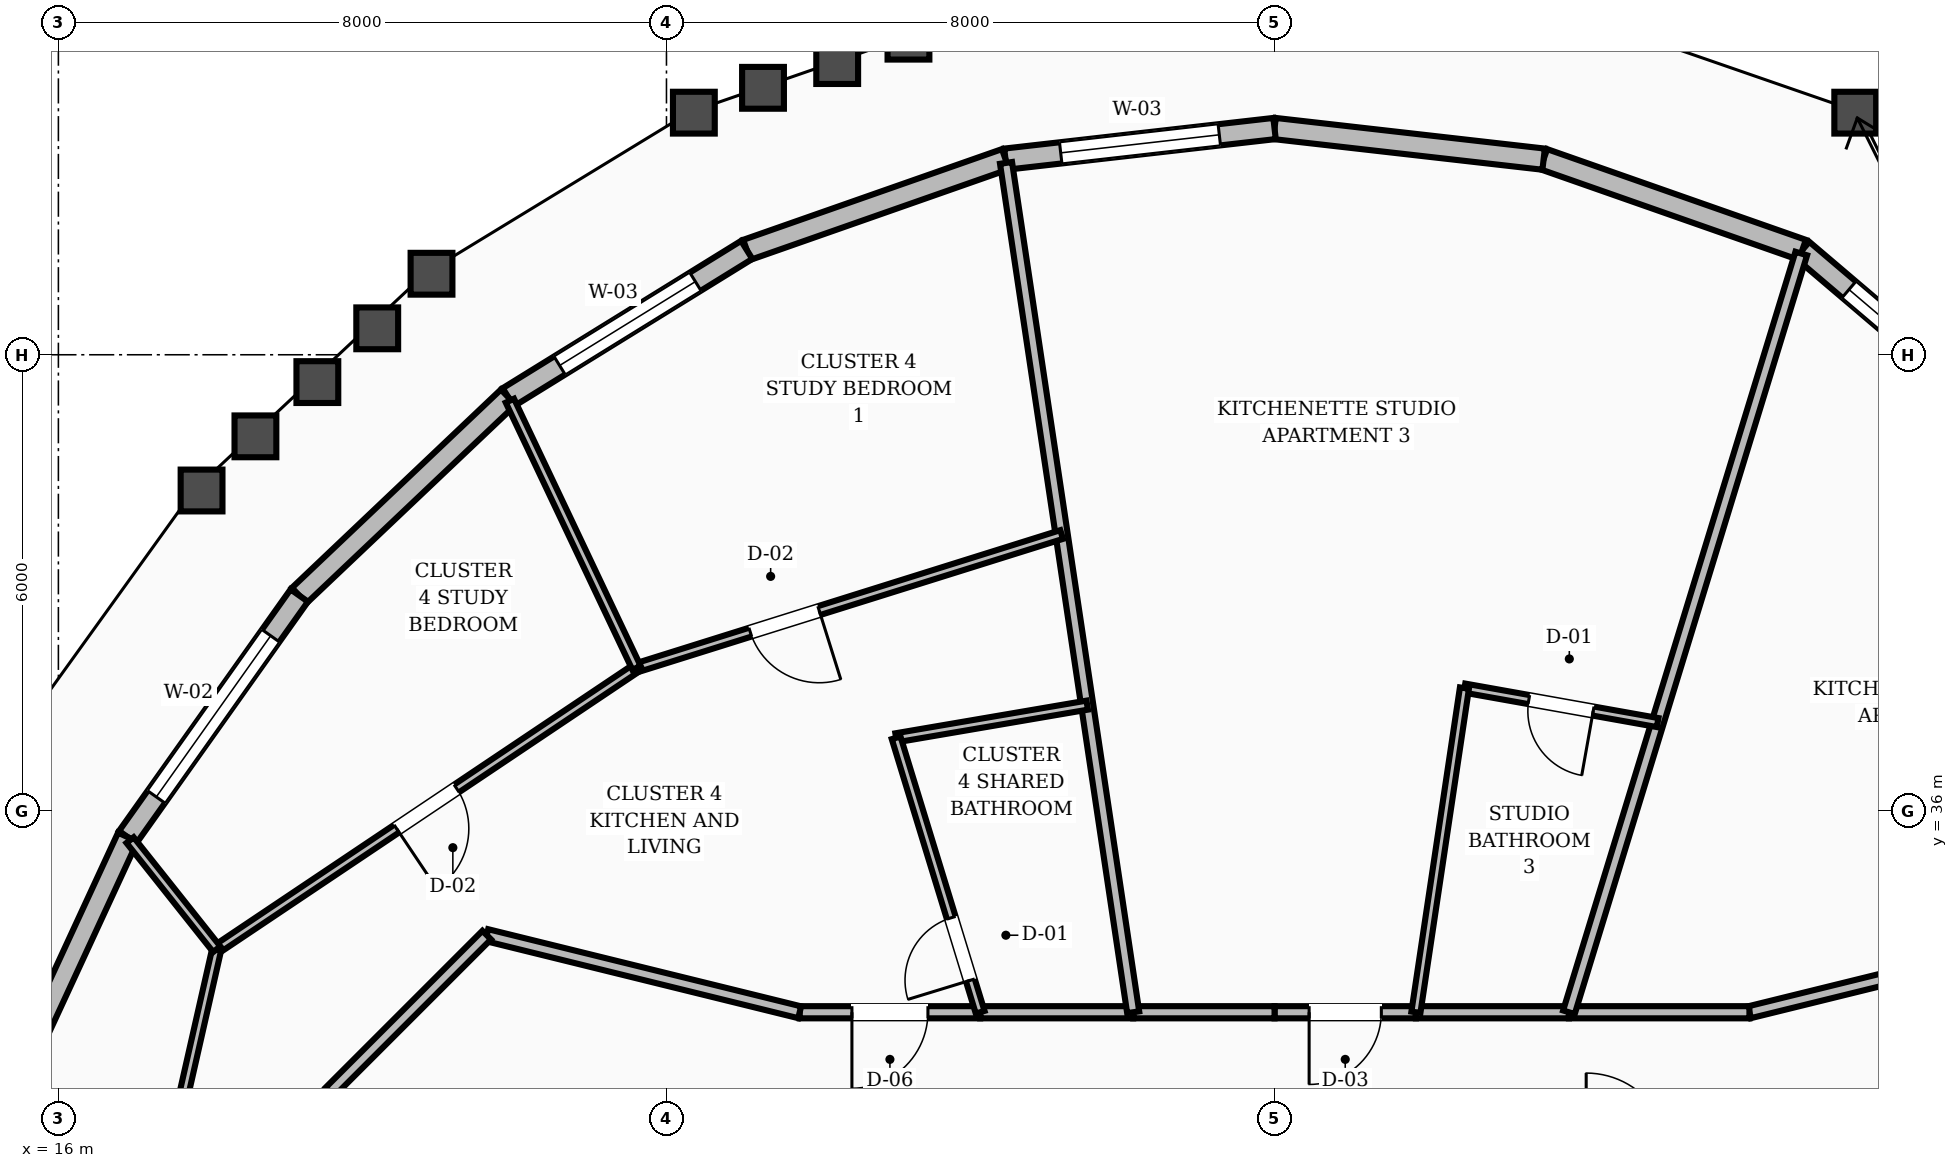
"""IFC4 building model, lengths in metres.
Left out: names, types, materials, properties, quantities, classifications, styles, units other than length and angle.
Written with IfcOpenShell. Run it as: python <this file> out.ifc"""

import sys

from ifc_helpers import new_model, si_unit, direction, frame, frame_2d, origin, place, context, subcontext, project, spatial, rectangle, extrude, element, fill, save


model = new_model("IFC4")
c1 = context("Model", 3, precision=1e-05, world=origin(), true_north=direction((0.0, 1.0)))
c2 = subcontext(c1, "Body", "Model", "MODEL_VIEW")
j1 = project(units=[si_unit("LENGTHUNIT", "METRE"), si_unit("PLANEANGLEUNIT", "RADIAN")], contexts=[c1])
p1 = place(None, origin())
s1 = spatial("IfcSite", under=j1, at=p1, CompositionType="ELEMENT")
p2 = place(p1, origin())
s2 = spatial("IfcBuilding", under=s1, at=p2, CompositionType="ELEMENT")
p3 = place(p2, frame((0.0, 0.0, 286.8)))
s3 = spatial("IfcBuildingStorey", under=s2, at=p3, CompositionType="ELEMENT", Elevation=286.8)
p4 = place(p3, frame((41.84, 40.916, 0.0), z_axis=(0.0, 0.0, 1.0), x_axis=(-0.7617032154, 0.64792608502, 0.0)))
e1 = element("IfcWall", 1, at=p4, inside=s3, PredefinedType="STANDARD", context=c2, shape_type="SweptSolid", body=[
    extrude(rectangle(XDim=3.802, YDim=0.28, at=frame_2d((1.901, 0.0))), origin(), (0.0, 0.0, 1.0), 2.88),
])
p5 = place(p4, frame((0.897, 0.0, 0.8)))
e2 = element("IfcOpeningElement", 2, at=p5, cuts=e1, PredefinedType="OPENING", context=c2, shape_type="SweptSolid", body=[
    extrude(rectangle(XDim=2.1, YDim=1.65, at=frame_2d((1.05, 0.825))), frame((0.0, 0.15, 0.0), z_axis=(0.0, -1.0, 0.0), x_axis=(1.0, 0.0, 0.0)), (0.0, 0.0, 1.0), 0.3),
])
p6 = place(p3, frame((38.944, 43.38, 0.0), z_axis=(0.0, 0.0, 1.0), x_axis=(-0.94366932977, 0.33089000597, 0.0)))
e3 = element("IfcWall", 3, at=p6, inside=s3, PredefinedType="STANDARD", context=c2, shape_type="SweptSolid", body=[
    extrude(rectangle(XDim=3.607, YDim=0.28, at=frame_2d((1.804, 0.0))), origin(), (0.0, 0.0, 1.0), 2.88),
])
p7 = place(p3, frame((35.54, 44.573, 0.0), z_axis=(0.0, 0.0, 1.0), x_axis=(-0.993580071332, 0.113131082605, 0.0)))
e4 = element("IfcWall", 4, at=p7, inside=s3, PredefinedType="STANDARD", context=c2, shape_type="SweptSolid", body=[
    extrude(rectangle(XDim=3.563, YDim=0.28, at=frame_2d((1.781, 0.0))), origin(), (0.0, 0.0, 1.0), 2.88),
])
p8 = place(p3, frame((32.0, 44.976, 0.0), z_axis=(0.0, 0.0, 1.0), x_axis=(-0.993580071332, -0.113131082605, 0.0)))
e5 = element("IfcWall", 5, at=p8, inside=s3, PredefinedType="STANDARD", context=c2, shape_type="SweptSolid", body=[
    extrude(rectangle(XDim=3.563, YDim=0.28, at=frame_2d((1.781, 0.0))), origin(), (0.0, 0.0, 1.0), 2.88),
])
p9 = place(p8, frame((0.731, 0.0, 0.8)))
e6 = element("IfcOpeningElement", 6, at=p9, cuts=e5, PredefinedType="OPENING", context=c2, shape_type="SweptSolid", body=[
    extrude(rectangle(XDim=2.1, YDim=1.65, at=frame_2d((1.05, 0.825))), frame((0.0, 0.15, 0.0), z_axis=(0.0, -1.0, 0.0), x_axis=(1.0, 0.0, 0.0)), (0.0, 0.0, 1.0), 0.3),
])
p10 = place(p3, frame((28.46, 44.573, 0.0), z_axis=(0.0, 0.0, 1.0), x_axis=(-0.94366932977, -0.33089000597, 0.0)))
e7 = element("IfcWall", 7, at=p10, inside=s3, PredefinedType="STANDARD", context=c2, shape_type="SweptSolid", body=[
    extrude(rectangle(XDim=3.607, YDim=0.28, at=frame_2d((1.804, 0.0))), origin(), (0.0, 0.0, 1.0), 2.88),
])
p11 = place(p3, frame((25.056, 43.38, 0.0), z_axis=(0.0, 0.0, 1.0), x_axis=(-0.850702223814, -0.525647911057, 0.0)))
e8 = element("IfcWall", 8, at=p11, inside=s3, PredefinedType="STANDARD", context=c2, shape_type="SweptSolid", body=[
    extrude(rectangle(XDim=3.688, YDim=0.28, at=frame_2d((1.844, 0.0))), origin(), (0.0, 0.0, 1.0), 2.88),
])
p12 = place(p11, frame((0.794, 0.0, 0.8)))
e9 = element("IfcOpeningElement", 9, at=p12, cuts=e8, PredefinedType="OPENING", context=c2, shape_type="SweptSolid", body=[
    extrude(rectangle(XDim=2.1, YDim=1.65, at=frame_2d((1.05, 0.825))), frame((0.0, 0.15, 0.0), z_axis=(0.0, -1.0, 0.0), x_axis=(1.0, 0.0, 0.0)), (0.0, 0.0, 1.0), 0.3),
])
p13 = place(p3, frame((21.919, 41.441, 0.0), z_axis=(0.0, 0.0, 1.0), x_axis=(-0.725476892889, -0.688246524063, 0.0)))
e10 = element("IfcWall", 10, at=p13, inside=s3, PredefinedType="STANDARD", context=c2, shape_type="SweptSolid", body=[
    extrude(rectangle(XDim=3.79, YDim=0.28, at=frame_2d((1.895, 0.0))), origin(), (0.0, 0.0, 1.0), 2.88),
])
p14 = place(p3, frame((19.169, 38.833, 0.0), z_axis=(0.0, 0.0, 1.0), x_axis=(-0.578913591695, -0.815388897, 0.0)))
e11 = element("IfcWall", 11, at=p14, inside=s3, PredefinedType="STANDARD", context=c2, shape_type="SweptSolid", body=[
    extrude(rectangle(XDim=3.898, YDim=0.28, at=frame_2d((1.949, 0.0))), origin(), (0.0, 0.0, 1.0), 2.88),
])
p15 = place(p14, frame((0.649, 0.0, 0.8)))
e12 = element("IfcOpeningElement", 12, at=p15, cuts=e11, PredefinedType="OPENING", context=c2, shape_type="SweptSolid", body=[
    extrude(rectangle(XDim=2.6, YDim=1.65, at=frame_2d((1.3, 0.825))), frame((0.0, 0.15, 0.0), z_axis=(0.0, -1.0, 0.0), x_axis=(1.0, 0.0, 0.0)), (0.0, 0.0, 1.0), 0.3),
])
p16 = place(p3, frame((16.912, 35.654, 0.0), z_axis=(0.0, 0.0, 1.0), x_axis=(-0.41967808517, -0.90767301647, 0.0)))
e13 = element("IfcWall", 13, at=p16, inside=s3, PredefinedType="STANDARD", context=c2, shape_type="SweptSolid", body=[
    extrude(rectangle(XDim=3.995, YDim=0.28, at=frame_2d((1.998, 0.0))), origin(), (0.0, 0.0, 1.0), 2.88),
])
p17 = place(p3, frame((42.365, 34.365, 0.0), z_axis=(0.0, 0.0, 1.0), x_axis=(-0.970939799552, -0.239323850978, 0.0)))
e14 = element("IfcWall", 14, at=p17, inside=s3, PredefinedType="SOLIDWALL", context=c2, shape_type="SweptSolid", body=[
    extrude(rectangle(XDim=4.241, YDim=0.16, at=frame_2d((2.12, 0.0))), origin(), (0.0, 0.0, 1.0), 2.87),
])
p18 = place(p3, frame((38.248, 33.35, 0.0), z_axis=(0.0, 0.0, 1.0), x_axis=(-1.0, 0.0, 0.0)))
e15 = element("IfcWall", 15, at=p18, inside=s3, PredefinedType="SOLIDWALL", context=c2, shape_type="SweptSolid", body=[
    extrude(rectangle(XDim=2.375, YDim=0.16, at=frame_2d((1.188, 0.0))), origin(), (0.0, 0.0, 1.0), 2.87),
])
p19 = place(p3, frame((35.873, 33.35, 0.0), z_axis=(0.0, 0.0, 1.0), x_axis=(-1.0, 0.0, 0.0)))
e16 = element("IfcWall", 16, at=p19, inside=s3, PredefinedType="SOLIDWALL", context=c2, shape_type="SweptSolid", body=[
    extrude(rectangle(XDim=2.013, YDim=0.16, at=frame_2d((1.006, 0.0))), origin(), (0.0, 0.0, 1.0), 2.87),
])
p20 = place(p3, frame((33.86, 33.35, 0.0), z_axis=(0.0, 0.0, 1.0), x_axis=(-1.0, 0.0, 0.0)))
e17 = element("IfcWall", 17, at=p20, inside=s3, PredefinedType="SOLIDWALL", context=c2, shape_type="SweptSolid", body=[
    extrude(rectangle(XDim=1.86, YDim=0.16, at=frame_2d((0.93, 0.0))), origin(), (0.0, 0.0, 1.0), 2.87),
])
p21 = place(p20, frame((0.455, 0.0, 0.0)))
e18 = element("IfcOpeningElement", 18, at=p21, cuts=e17, PredefinedType="OPENING", context=c2, shape_type="SweptSolid", body=[
    extrude(rectangle(XDim=0.95, YDim=2.1, at=frame_2d((0.475, 1.05))), frame((0.0, 0.09, 0.0), z_axis=(0.0, -1.0, 0.0), x_axis=(1.0, 0.0, 0.0)), (0.0, 0.0, 1.0), 0.18),
])
p22 = place(p3, frame((32.0, 33.35, 0.0), z_axis=(0.0, 0.0, 1.0), x_axis=(-1.0, 0.0, 0.0)))
e19 = element("IfcWall", 19, at=p22, inside=s3, PredefinedType="SOLIDWALL", context=c2, shape_type="SweptSolid", body=[
    extrude(rectangle(XDim=1.86, YDim=0.16, at=frame_2d((0.93, 0.0))), origin(), (0.0, 0.0, 1.0), 2.87),
])
p23 = place(p3, frame((30.14, 33.35, 0.0), z_axis=(0.0, 0.0, 1.0), x_axis=(-1.0, 0.0, 0.0)))
e20 = element("IfcWall", 20, at=p23, inside=s3, PredefinedType="SOLIDWALL", context=c2, shape_type="SweptSolid", body=[
    extrude(rectangle(XDim=2.013, YDim=0.16, at=frame_2d((1.006, 0.0))), origin(), (0.0, 0.0, 1.0), 2.87),
])
p24 = place(p3, frame((28.127, 33.35, 0.0), z_axis=(0.0, 0.0, 1.0), x_axis=(-1.0, 0.0, 0.0)))
e21 = element("IfcWall", 21, at=p24, inside=s3, PredefinedType="SOLIDWALL", context=c2, shape_type="SweptSolid", body=[
    extrude(rectangle(XDim=2.375, YDim=0.16, at=frame_2d((1.188, 0.0))), origin(), (0.0, 0.0, 1.0), 2.87),
])
p25 = place(p24, frame((0.687, 0.0, 0.0)))
e22 = element("IfcOpeningElement", 22, at=p25, cuts=e21, PredefinedType="OPENING", context=c2, shape_type="SweptSolid", body=[
    extrude(rectangle(XDim=1.0, YDim=2.1, at=frame_2d((0.5, 1.05))), frame((0.0, 0.09, 0.0), z_axis=(0.0, -1.0, 0.0), x_axis=(1.0, 0.0, 0.0)), (0.0, 0.0, 1.0), 0.18),
])
p26 = place(p3, frame((25.752, 33.35, 0.0), z_axis=(0.0, 0.0, 1.0), x_axis=(-0.970939799552, 0.239323850978, 0.0)))
e23 = element("IfcWall", 23, at=p26, inside=s3, PredefinedType="SOLIDWALL", context=c2, shape_type="SweptSolid", body=[
    extrude(rectangle(XDim=4.241, YDim=0.16, at=frame_2d((2.12, 0.0))), origin(), (0.0, 0.0, 1.0), 2.87),
])
p27 = place(p3, frame((21.635, 34.365, 0.0), z_axis=(0.0, 0.0, 1.0), x_axis=(-0.707106781187, -0.707106781187, 0.0)))
e24 = element("IfcWall", 24, at=p27, inside=s3, PredefinedType="SOLIDWALL", context=c2, shape_type="SweptSolid", body=[
    extrude(rectangle(XDim=2.916, YDim=0.16, at=frame_2d((1.458, 0.0))), origin(), (0.0, 0.0, 1.0), 2.87),
])
p28 = place(p3, frame((35.873, 33.35, 0.0), z_axis=(0.0, 0.0, 1.0), x_axis=(0.292803730525, 0.956172565696, 0.0)))
e25 = element("IfcWall", 25, at=p28, inside=s3, PredefinedType="SOLIDWALL", context=c2, shape_type="SweptSolid", body=[
    extrude(rectangle(XDim=10.439, YDim=0.16, at=frame_2d((5.22, 0.0))), origin(), (0.0, 0.0, 1.0), 2.87),
])
p29 = place(p3, frame((37.04, 37.161, 0.0), z_axis=(0.0, 0.0, 1.0), x_axis=(-0.984445687122, 0.175689183236, 0.0)))
e26 = element("IfcWall", 26, at=p29, inside=s3, PredefinedType="PARTITIONING", context=c2, shape_type="SweptSolid", body=[
    extrude(rectangle(XDim=2.582, YDim=0.12, at=frame_2d((1.291, 0.0))), origin(), (0.0, 0.0, 1.0), 2.87),
])
p30 = place(p29, frame((0.861, 0.0, 0.0)))
e27 = element("IfcOpeningElement", 27, at=p30, cuts=e26, PredefinedType="OPENING", context=c2, shape_type="SweptSolid", body=[
    extrude(rectangle(XDim=0.86, YDim=2.1, at=frame_2d((0.43, 1.05))), frame((0.0, 0.07, 0.0), z_axis=(0.0, -1.0, 0.0), x_axis=(1.0, 0.0, 0.0)), (0.0, 0.0, 1.0), 0.14),
])
p31 = place(p3, frame((33.86, 33.35, 0.0), z_axis=(0.0, 0.0, 1.0), x_axis=(0.148044229088, 0.988980741083, 0.0)))
e28 = element("IfcWall", 28, at=p31, inside=s3, PredefinedType="PARTITIONING", context=c2, shape_type="SweptSolid", body=[
    extrude(rectangle(XDim=4.312, YDim=0.12, at=frame_2d((2.156, 0.0))), origin(), (0.0, 0.0, 1.0), 2.87),
])
p32 = place(p3, frame((30.14, 33.35, 0.0), z_axis=(0.0, 0.0, 1.0), x_axis=(-0.148061491239, 0.988978156893, 0.0)))
e29 = element("IfcWall", 29, at=p32, inside=s3, PredefinedType="SOLIDWALL", context=c2, shape_type="SweptSolid", body=[
    extrude(rectangle(XDim=11.298, YDim=0.16, at=frame_2d((5.649, 0.0))), origin(), (0.0, 0.0, 1.0), 2.87),
])
p33 = place(p3, frame((29.535, 37.39, 0.0), z_axis=(0.0, 0.0, 1.0), x_axis=(-0.985705034141, -0.168480223375, 0.0)))
e30 = element("IfcWall", 30, at=p33, inside=s3, PredefinedType="PARTITIONING", context=c2, shape_type="SweptSolid", body=[
    extrude(rectangle(XDim=2.55, YDim=0.12, at=frame_2d((1.275, 0.0))), origin(), (0.0, 0.0, 1.0), 2.87),
])
p34 = place(p3, frame((28.127, 33.35, 0.0), z_axis=(0.0, 0.0, 1.0), x_axis=(-0.292818022088, 0.956168189149, 0.0)))
e31 = element("IfcWall", 31, at=p34, inside=s3, PredefinedType="PARTITIONING", context=c2, shape_type="SweptSolid", body=[
    extrude(rectangle(XDim=3.776, YDim=0.12, at=frame_2d((1.888, 0.0))), origin(), (0.0, 0.0, 1.0), 2.87),
])
p35 = place(p34, frame((0.44, 0.0, 0.0)))
e32 = element("IfcOpeningElement", 32, at=p35, cuts=e31, PredefinedType="OPENING", context=c2, shape_type="SweptSolid", body=[
    extrude(rectangle(XDim=0.86, YDim=2.1, at=frame_2d((0.43, 1.05))), frame((0.0, 0.07, 0.0), z_axis=(0.0, -1.0, 0.0), x_axis=(1.0, 0.0, 0.0)), (0.0, 0.0, 1.0), 0.14),
])
p36 = place(p3, frame((29.199, 39.635, 0.0), z_axis=(0.0, 0.0, 1.0), x_axis=(-0.954191258794, -0.299197328933, 0.0)))
e33 = element("IfcWall", 33, at=p36, inside=s3, PredefinedType="PARTITIONING", context=c2, shape_type="SweptSolid", body=[
    extrude(rectangle(XDim=5.862, YDim=0.12, at=frame_2d((2.931, 0.0))), origin(), (0.0, 0.0, 1.0), 2.87),
])
p37 = place(p36, frame((3.343, 0.0, 0.0)))
e34 = element("IfcOpeningElement", 34, at=p37, cuts=e33, PredefinedType="OPENING", context=c2, shape_type="SweptSolid", body=[
    extrude(rectangle(XDim=0.95, YDim=2.1, at=frame_2d((0.475, 1.05))), frame((0.0, 0.07, 0.0), z_axis=(0.0, -1.0, 0.0), x_axis=(1.0, 0.0, 0.0)), (0.0, 0.0, 1.0), 0.14),
])
p38 = place(p3, frame((23.606, 37.881, 0.0), z_axis=(0.0, 0.0, 1.0), x_axis=(-0.830686252562, -0.556740828217, 0.0)))
e35 = element("IfcWall", 35, at=p38, inside=s3, PredefinedType="PARTITIONING", context=c2, shape_type="SweptSolid", body=[
    extrude(rectangle(XDim=6.648, YDim=0.12, at=frame_2d((3.324, 0.0))), origin(), (0.0, 0.0, 1.0), 2.87),
])
p39 = place(p38, frame((2.849, 0.0, 0.0)))
e36 = element("IfcOpeningElement", 36, at=p39, cuts=e35, PredefinedType="OPENING", context=c2, shape_type="SweptSolid", body=[
    extrude(rectangle(XDim=0.95, YDim=2.1, at=frame_2d((0.475, 1.05))), frame((0.0, 0.07, 0.0), z_axis=(0.0, -1.0, 0.0), x_axis=(1.0, 0.0, 0.0)), (0.0, 0.0, 1.0), 0.14),
])
p40 = place(p3, frame((23.606, 37.881, 0.0), z_axis=(0.0, 0.0, 1.0), x_axis=(-0.428207759879, 0.903680316472, 0.0)))
e37 = element("IfcWall", 37, at=p40, inside=s3, PredefinedType="PARTITIONING", context=c2, shape_type="SweptSolid", body=[
    extrude(rectangle(XDim=3.89, YDim=0.12, at=frame_2d((1.945, 0.0))), origin(), (0.0, 0.0, 1.0), 2.87),
])
p41 = place(p3, frame((18.083, 34.18, 0.0), z_axis=(0.0, 0.0, 1.0), x_axis=(-0.22107591462, -0.975256602118, 0.0)))
e38 = element("IfcWall", 38, at=p41, inside=s3, PredefinedType="PARTITIONING", context=c2, shape_type="SweptSolid", body=[
    extrude(rectangle(XDim=6.968, YDim=0.12, at=frame_2d((3.484, 0.0))), origin(), (0.0, 0.0, 1.0), 2.87),
])
p42 = place(p41, frame((3.009, 0.0, 0.0)))
e39 = element("IfcOpeningElement", 39, at=p42, cuts=e38, PredefinedType="OPENING", context=c2, shape_type="SweptSolid", body=[
    extrude(rectangle(XDim=0.95, YDim=2.1, at=frame_2d((0.475, 1.05))), frame((0.0, 0.07, 0.0), z_axis=(0.0, -1.0, 0.0), x_axis=(1.0, 0.0, 0.0)), (0.0, 0.0, 1.0), 0.14),
])
p43 = place(p3, frame((18.083, 34.18, 0.0), z_axis=(0.0, 0.0, 1.0), x_axis=(-0.621896561533, 0.783099397748, 0.0)))
e40 = element("IfcWall", 40, at=p43, inside=s3, PredefinedType="PARTITIONING", context=c2, shape_type="SweptSolid", body=[
    extrude(rectangle(XDim=1.833, YDim=0.12, at=frame_2d((0.916, 0.0))), origin(), (0.0, 0.0, 1.0), 2.87),
])
p44 = place(p5, origin())
e41 = element("IfcWindow", 41, at=p44, inside=s3, PartitioningType="SINGLE_PANEL", PredefinedType="WINDOW", context=c2, shape_type="SweptSolid", body=[
    extrude(rectangle(XDim=2.1, YDim=1.65, at=frame_2d((1.05, 0.825))), frame((0.0, 0.03, 0.0), z_axis=(0.0, -1.0, 0.0), x_axis=(1.0, 0.0, 0.0)), (0.0, 0.0, 1.0), 0.06),
])
fill(e2, e41)
p45 = place(p9, origin())
e42 = element("IfcWindow", 42, at=p45, inside=s3, PartitioningType="SINGLE_PANEL", PredefinedType="WINDOW", context=c2, shape_type="SweptSolid", body=[
    extrude(rectangle(XDim=2.1, YDim=1.65, at=frame_2d((1.05, 0.825))), frame((0.0, 0.03, 0.0), z_axis=(0.0, -1.0, 0.0), x_axis=(1.0, 0.0, 0.0)), (0.0, 0.0, 1.0), 0.06),
])
fill(e6, e42)
p46 = place(p12, origin())
e43 = element("IfcWindow", 43, at=p46, inside=s3, PartitioningType="SINGLE_PANEL", PredefinedType="WINDOW", context=c2, shape_type="SweptSolid", body=[
    extrude(rectangle(XDim=2.1, YDim=1.65, at=frame_2d((1.05, 0.825))), frame((0.0, 0.03, 0.0), z_axis=(0.0, -1.0, 0.0), x_axis=(1.0, 0.0, 0.0)), (0.0, 0.0, 1.0), 0.06),
])
fill(e9, e43)
p47 = place(p15, origin())
e44 = element("IfcWindow", 44, at=p47, inside=s3, PartitioningType="SINGLE_PANEL", PredefinedType="WINDOW", context=c2, shape_type="SweptSolid", body=[
    extrude(rectangle(XDim=2.6, YDim=1.65, at=frame_2d((1.3, 0.825))), frame((0.0, 0.03, 0.0), z_axis=(0.0, -1.0, 0.0), x_axis=(1.0, 0.0, 0.0)), (0.0, 0.0, 1.0), 0.06),
])
fill(e12, e44)
p48 = place(p30, origin())
e45 = element("IfcDoor", 45, at=p48, inside=s3, OperationType="SINGLE_SWING_LEFT", PredefinedType="DOOR", context=c2, shape_type="SweptSolid", body=[
    extrude(rectangle(XDim=0.86, YDim=2.1, at=frame_2d((0.43, 1.05))), frame((0.0, 0.025, 0.0), z_axis=(0.0, -1.0, 0.0), x_axis=(1.0, 0.0, 0.0)), (0.0, 0.0, 1.0), 0.05),
])
fill(e27, e45)
p49 = place(p21, origin())
e46 = element("IfcDoor", 46, at=p49, inside=s3, OperationType="SINGLE_SWING_RIGHT", PredefinedType="DOOR", context=c2, shape_type="SweptSolid", body=[
    extrude(rectangle(XDim=0.95, YDim=2.1, at=frame_2d((0.475, 1.05))), frame((0.0, 0.025, 0.0), z_axis=(0.0, -1.0, 0.0), x_axis=(1.0, 0.0, 0.0)), (0.0, 0.0, 1.0), 0.05),
])
fill(e18, e46)
p50 = place(p35, origin())
e47 = element("IfcDoor", 47, at=p50, inside=s3, OperationType="SINGLE_SWING_LEFT", PredefinedType="DOOR", context=c2, shape_type="SweptSolid", body=[
    extrude(rectangle(XDim=0.86, YDim=2.1, at=frame_2d((0.43, 1.05))), frame((0.0, 0.025, 0.0), z_axis=(0.0, -1.0, 0.0), x_axis=(1.0, 0.0, 0.0)), (0.0, 0.0, 1.0), 0.05),
])
fill(e32, e47)
p51 = place(p25, origin())
e48 = element("IfcDoor", 48, at=p51, inside=s3, OperationType="SINGLE_SWING_RIGHT", PredefinedType="DOOR", context=c2, shape_type="SweptSolid", body=[
    extrude(rectangle(XDim=1.0, YDim=2.1, at=frame_2d((0.5, 1.05))), frame((0.0, 0.025, 0.0), z_axis=(0.0, -1.0, 0.0), x_axis=(1.0, 0.0, 0.0)), (0.0, 0.0, 1.0), 0.05),
])
fill(e22, e48)
p52 = place(p37, origin())
e49 = element("IfcDoor", 49, at=p52, inside=s3, OperationType="SINGLE_SWING_LEFT", PredefinedType="DOOR", context=c2, shape_type="SweptSolid", body=[
    extrude(rectangle(XDim=0.95, YDim=2.1, at=frame_2d((0.475, 1.05))), frame((0.0, 0.025, 0.0), z_axis=(0.0, -1.0, 0.0), x_axis=(1.0, 0.0, 0.0)), (0.0, 0.0, 1.0), 0.05),
])
fill(e34, e49)
p53 = place(p39, origin())
e50 = element("IfcDoor", 50, at=p53, inside=s3, OperationType="SINGLE_SWING_RIGHT", PredefinedType="DOOR", context=c2, shape_type="SweptSolid", body=[
    extrude(rectangle(XDim=0.95, YDim=2.1, at=frame_2d((0.475, 1.05))), frame((0.0, 0.025, 0.0), z_axis=(0.0, -1.0, 0.0), x_axis=(1.0, 0.0, 0.0)), (0.0, 0.0, 1.0), 0.05),
])
fill(e36, e50)
save(model, sys.argv[1])
